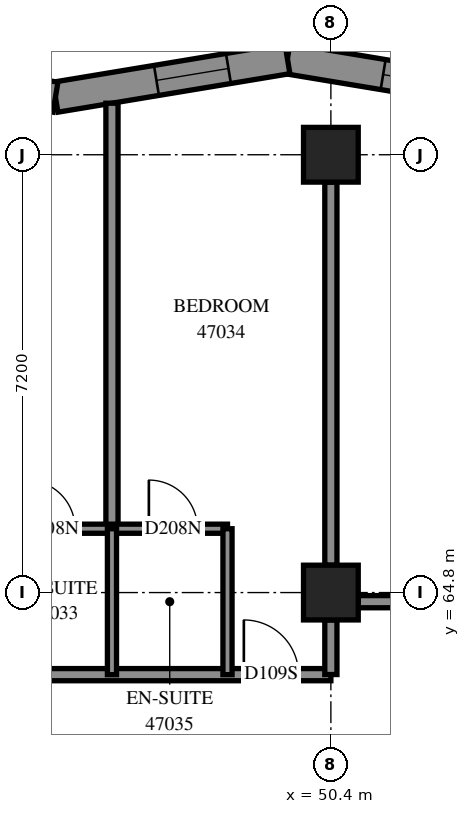
"""IFC4 building model, lengths in metres.
Left out: names, types, materials, properties, quantities, classifications, styles, units other than length and angle.
Written with IfcOpenShell. Run it as: python <this file> out.ifc"""

import sys

from ifc_helpers import new_model, si_unit, direction, frame, frame_2d, origin, origin_2d, place, context, subcontext, project, spatial, polyline, rectangle, outline, extrude, element, fill, save


model = new_model("IFC4")
c1 = context("Model", 3, precision=1e-05, world=origin(), true_north=direction((0.0, 1.0)))
c2 = subcontext(c1, "Body", "Model", "MODEL_VIEW")
j1 = project(units=[si_unit("LENGTHUNIT", "METRE"), si_unit("PLANEANGLEUNIT", "RADIAN")], contexts=[c1])
p1 = place(None, origin())
s1 = spatial("IfcSite", under=j1, at=p1, CompositionType="ELEMENT")
p2 = place(p1, origin())
s2 = spatial("IfcBuilding", under=s1, at=p2, CompositionType="ELEMENT")
p3 = place(p2, frame((0.0, 0.0, 172.8)))
s3 = spatial("IfcBuildingStorey", under=s2, at=p3, CompositionType="ELEMENT", Elevation=172.8)
for number, where, z_axis, x_axis in (
    (1, (50.4, 64.8, 0.0), (0.0, 0.0, 1.0), (1.0, 0.0, 0.0)),
    (2, (50.4, 72.0, 0.0), (0.0, 0.0, 1.0), (1.0, 0.0, 0.0)),
):
    element("IfcColumn", number, at=place(p3, frame(where, z_axis=z_axis, x_axis=x_axis)), inside=s3, PredefinedType="COLUMN", context=c2, shape_type="SweptSolid", body=[
        extrude(rectangle(XDim=0.9, YDim=0.9, at=origin_2d()), origin(), (0.0, 0.0, 1.0), 3.1),
    ])
p4 = place(p3, frame((53.5, 72.947, 0.0), z_axis=(0.0, 0.0, 1.0), x_axis=(-0.9865110911, 0.1636944324, 0.0)))
e3 = element("IfcWall", 3, at=p4, inside=s3, PredefinedType="SOLIDWALL", context=c2, shape_type="SweptSolid", body=[
    extrude(outline(polyline([(0.042, -0.25), (3.908, -0.25), (3.825, 0.25), (-0.042, 0.25), (0.042, -0.25)])), origin(), (0.0, 0.0, 1.0), 3.1),
])
p5 = place(p4, frame((1.071, 0.0, 0.45)))
e4 = element("IfcOpeningElement", 4, at=p5, cuts=e3, PredefinedType="OPENING", context=c2, shape_type="SweptSolid", body=[
    extrude(rectangle(XDim=1.2, YDim=2.5, at=frame_2d((0.6, 1.25))), frame((0.0, 0.26, 0.0), z_axis=(0.0, -1.0, 0.0), x_axis=(1.0, 0.0, 0.0)), (0.0, 0.0, 1.0), 0.52),
])
p6 = place(p3, frame((49.685, 73.58, 0.0), z_axis=(0.0, 0.0, 1.0), x_axis=(-0.9865110911, -0.1636944324, 0.0)))
e5 = element("IfcWall", 5, at=p6, inside=s3, PredefinedType="SOLIDWALL", context=c2, shape_type="SweptSolid", body=[
    extrude(outline(polyline([(-0.042, -0.25), (3.825, -0.25), (3.908, 0.25), (0.042, 0.25), (-0.042, -0.25)])), origin(), (0.0, 0.0, 1.0), 3.1),
])
p7 = place(p6, frame((0.983, 0.0, 0.45)))
e6 = element("IfcOpeningElement", 6, at=p7, cuts=e5, PredefinedType="OPENING", context=c2, shape_type="SweptSolid", body=[
    extrude(rectangle(XDim=1.2, YDim=2.5, at=frame_2d((0.6, 1.25))), frame((0.0, 0.26, 0.0), z_axis=(0.0, -1.0, 0.0), x_axis=(1.0, 0.0, 0.0)), (0.0, 0.0, 1.0), 0.52),
])
p8 = place(p3, frame((45.87, 72.947, 0.0), z_axis=(0.0, 0.0, 1.0), x_axis=(-0.9865110911, 0.1636944324, 0.0)))
e7 = element("IfcWall", 7, at=p8, inside=s3, PredefinedType="SOLIDWALL", context=c2, shape_type="SweptSolid", body=[
    extrude(outline(polyline([(0.042, -0.25), (3.908, -0.25), (3.825, 0.25), (-0.042, 0.25), (0.042, -0.25)])), origin(), (0.0, 0.0, 1.0), 3.1),
])
p9 = place(p8, frame((0.854, 0.0, 0.45)))
e8 = element("IfcOpeningElement", 8, at=p9, cuts=e7, PredefinedType="OPENING", context=c2, shape_type="SweptSolid", body=[
    extrude(rectangle(XDim=1.2, YDim=2.5, at=frame_2d((0.6, 1.25))), frame((0.0, 0.26, 0.0), z_axis=(0.0, -1.0, 0.0), x_axis=(1.0, 0.0, 0.0)), (0.0, 0.0, 1.0), 0.52),
])
p10 = place(p3, frame((40.65, 63.45, 0.0), z_axis=(0.0, 0.0, 1.0), x_axis=(1.0, 0.0, 0.0)))
e9 = element("IfcWall", 9, at=p10, inside=s3, PredefinedType="PARTITIONING", context=c2, shape_type="SweptSolid", body=[
    extrude(rectangle(XDim=9.75, YDim=0.2, at=frame_2d((4.875, 0.0))), origin(), (0.0, 0.0, 1.0), 3.1),
])
p11 = place(p10, frame((0.144, 0.0, 0.0)))
e10 = element("IfcOpeningElement", 10, at=p11, cuts=e9, PredefinedType="OPENING", context=c2, shape_type="SweptSolid", body=[
    extrude(rectangle(XDim=1.0, YDim=2.1, at=frame_2d((0.5, 1.05))), frame((0.0, 0.11, 0.0), z_axis=(0.0, -1.0, 0.0), x_axis=(1.0, 0.0, 0.0)), (0.0, 0.0, 1.0), 0.22),
])
p12 = place(p10, frame((3.102, 0.0, 0.0)))
e11 = element("IfcOpeningElement", 11, at=p12, cuts=e9, PredefinedType="OPENING", context=c2, shape_type="SweptSolid", body=[
    extrude(rectangle(XDim=0.9, YDim=2.1, at=frame_2d((0.45, 1.05))), frame((0.0, 0.11, 0.0), z_axis=(0.0, -1.0, 0.0), x_axis=(1.0, 0.0, 0.0)), (0.0, 0.0, 1.0), 0.22),
])
p13 = place(p10, frame((8.319, 0.0, 0.0)))
e12 = element("IfcOpeningElement", 12, at=p13, cuts=e9, PredefinedType="OPENING", context=c2, shape_type="SweptSolid", body=[
    extrude(rectangle(XDim=0.9, YDim=2.1, at=frame_2d((0.45, 1.05))), frame((0.0, 0.11, 0.0), z_axis=(0.0, -1.0, 0.0), x_axis=(1.0, 0.0, 0.0)), (0.0, 0.0, 1.0), 0.22),
])
p14 = place(p3, frame((46.8, 65.85, 0.0), z_axis=(0.0, 0.0, 1.0), x_axis=(0.0, 1.0, 0.0)))
e13 = element("IfcWall", 13, at=p14, inside=s3, PredefinedType="PARTITIONING", context=c2, shape_type="SweptSolid", body=[
    extrude(rectangle(XDim=6.997, YDim=0.2, at=frame_2d((3.499, 0.0))), origin(), (0.0, 0.0, 1.0), 3.1),
])
p15 = place(p3, frame((50.4, 65.25, 0.0), z_axis=(0.0, 0.0, 1.0), x_axis=(0.0, 1.0, 0.0)))
e14 = element("IfcWall", 14, at=p15, inside=s3, PredefinedType="PARTITIONING", context=c2, shape_type="SweptSolid", body=[
    extrude(rectangle(XDim=6.3, YDim=0.2, at=frame_2d((3.15, 0.0))), origin(), (0.0, 0.0, 1.0), 3.1),
])
p16 = place(p3, frame((50.85, 64.65, 0.0), z_axis=(0.0, 0.0, 1.0), x_axis=(1.0, 0.0, 0.0)))
e15 = element("IfcWall", 15, at=p16, inside=s3, PredefinedType="PARTITIONING", context=c2, shape_type="SweptSolid", body=[
    extrude(rectangle(XDim=4.65, YDim=0.2, at=frame_2d((2.325, 0.0))), origin(), (0.0, 0.0, 1.0), 3.1),
])
p17 = place(p16, frame((3.509, 0.0, 0.0)))
e16 = element("IfcOpeningElement", 16, at=p17, cuts=e15, PredefinedType="OPENING", context=c2, shape_type="SweptSolid", body=[
    extrude(rectangle(XDim=1.0, YDim=2.1, at=frame_2d((0.5, 1.05))), frame((0.0, 0.11, 0.0), z_axis=(0.0, -1.0, 0.0), x_axis=(1.0, 0.0, 0.0)), (0.0, 0.0, 1.0), 0.22),
])
p18 = place(p3, frame((44.9, 65.85, 0.0), z_axis=(0.0, 0.0, 1.0), x_axis=(1.0, 0.0, 0.0)))
e17 = element("IfcWall", 17, at=p18, inside=s3, PredefinedType="PARTITIONING", context=c2, shape_type="SweptSolid", body=[
    extrude(rectangle(XDim=3.8, YDim=0.15, at=frame_2d((1.9, 0.0))), origin(), (0.0, 0.0, 1.0), 3.1),
])
p19 = place(p18, frame((0.493, 0.0, 0.0)))
e18 = element("IfcOpeningElement", 18, at=p19, cuts=e17, PredefinedType="OPENING", context=c2, shape_type="SweptSolid", body=[
    extrude(rectangle(XDim=0.8, YDim=2.1, at=frame_2d((0.4, 1.05))), frame((0.0, 0.085, 0.0), z_axis=(0.0, -1.0, 0.0), x_axis=(1.0, 0.0, 0.0)), (0.0, 0.0, 1.0), 0.17),
])
p20 = place(p18, frame((2.507, 0.0, 0.0)))
e19 = element("IfcOpeningElement", 19, at=p20, cuts=e17, PredefinedType="OPENING", context=c2, shape_type="SweptSolid", body=[
    extrude(rectangle(XDim=0.8, YDim=2.1, at=frame_2d((0.4, 1.05))), frame((0.0, 0.085, 0.0), z_axis=(0.0, -1.0, 0.0), x_axis=(1.0, 0.0, 0.0)), (0.0, 0.0, 1.0), 0.17),
])
for number, where, z_axis, x_axis in (
    (20, (46.8, 63.45, 0.0), (0.0, 0.0, 1.0), (0.0, 1.0, 0.0)),
    (21, (48.7, 63.45, 0.0), (0.0, 0.0, 1.0), (0.0, 1.0, 0.0)),
):
    element("IfcWall", number, at=place(p3, frame(where, z_axis=z_axis, x_axis=x_axis)), inside=s3, PredefinedType="PARTITIONING", context=c2, shape_type="SweptSolid", body=[
        extrude(rectangle(XDim=2.4, YDim=0.15, at=frame_2d((1.2, 0.0))), origin(), (0.0, 0.0, 1.0), 3.1),
    ])
p21 = place(p3, frame((50.4, 63.452, 0.0), z_axis=(0.0, 0.0, 1.0), x_axis=(0.0, 1.0, 0.0)))
e22 = element("IfcWall", 22, at=p21, inside=s3, PredefinedType="PARTITIONING", context=c2, shape_type="SweptSolid", body=[
    extrude(rectangle(XDim=0.898, YDim=0.2, at=frame_2d((0.449, 0.0))), origin(), (0.0, 0.0, 1.0), 3.1),
])
p22 = place(p5, origin())
e23 = element("IfcWindow", 23, at=p22, inside=s3, PartitioningType="SINGLE_PANEL", PredefinedType="WINDOW", context=c2, shape_type="SweptSolid", body=[
    extrude(rectangle(XDim=1.2, YDim=2.5, at=frame_2d((0.6, 1.25))), frame((0.0, 0.18, 0.0), z_axis=(0.0, -1.0, 0.0), x_axis=(1.0, 0.0, 0.0)), (0.0, 0.0, 1.0), 0.06),
])
fill(e4, e23)
p23 = place(p7, origin())
e24 = element("IfcWindow", 24, at=p23, inside=s3, PartitioningType="SINGLE_PANEL", PredefinedType="WINDOW", context=c2, shape_type="SweptSolid", body=[
    extrude(rectangle(XDim=1.2, YDim=2.5, at=frame_2d((0.6, 1.25))), frame((0.0, 0.18, 0.0), z_axis=(0.0, -1.0, 0.0), x_axis=(1.0, 0.0, 0.0)), (0.0, 0.0, 1.0), 0.06),
])
fill(e6, e24)
p24 = place(p19, origin())
e25 = element("IfcDoor", 25, at=p24, inside=s3, OperationType="SINGLE_SWING_RIGHT", PredefinedType="DOOR", context=c2, shape_type="SweptSolid", body=[
    extrude(rectangle(XDim=0.8, YDim=2.1, at=frame_2d((0.4, 1.05))), frame((0.0, 0.025, 0.0), z_axis=(0.0, -1.0, 0.0), x_axis=(1.0, 0.0, 0.0)), (0.0, 0.0, 1.0), 0.05),
])
fill(e18, e25)
p25 = place(p13, origin())
e26 = element("IfcDoor", 26, at=p25, inside=s3, OperationType="SINGLE_SWING_LEFT", PredefinedType="DOOR", context=c2, shape_type="SweptSolid", body=[
    extrude(rectangle(XDim=0.9, YDim=2.1, at=frame_2d((0.45, 1.05))), frame((0.0, 0.025, 0.0), z_axis=(0.0, -1.0, 0.0), x_axis=(1.0, 0.0, 0.0)), (0.0, 0.0, 1.0), 0.05),
])
fill(e12, e26)
p26 = place(p20, origin())
e27 = element("IfcDoor", 27, at=p26, inside=s3, OperationType="SINGLE_SWING_RIGHT", PredefinedType="DOOR", context=c2, shape_type="SweptSolid", body=[
    extrude(rectangle(XDim=0.8, YDim=2.1, at=frame_2d((0.4, 1.05))), frame((0.0, 0.025, 0.0), z_axis=(0.0, -1.0, 0.0), x_axis=(1.0, 0.0, 0.0)), (0.0, 0.0, 1.0), 0.05),
])
fill(e19, e27)
save(model, sys.argv[1])
